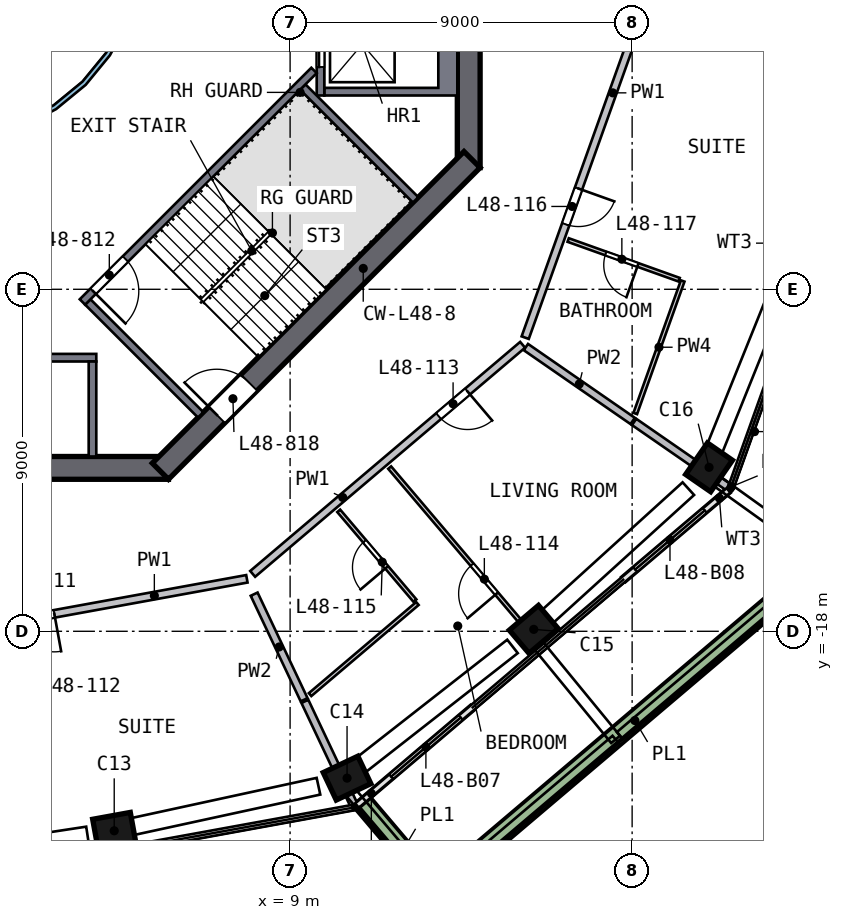
"""IFC4 building model, lengths in metres.
Left out: names, types, materials, properties, quantities, classifications, styles, units other than length and angle.
Written with IfcOpenShell. Run it as: python <this file> out.ifc"""

import sys

from ifc_helpers import new_model, si_unit, direction, frame, frame_2d, origin, origin_2d, place, context, subcontext, project, spatial, polyline, rectangle, outline, extrude, element, fill, save


model = new_model("IFC4")
c1 = context("Model", 3, precision=1e-05, world=origin(), true_north=direction((0.0, 1.0)))
c2 = subcontext(c1, "Body", "Model", "MODEL_VIEW")
j1 = project(units=[si_unit("LENGTHUNIT", "METRE"), si_unit("PLANEANGLEUNIT", "RADIAN")], contexts=[c1])
p1 = place(None, origin())
s1 = spatial("IfcSite", under=j1, at=p1, CompositionType="ELEMENT")
p2 = place(p1, origin())
s2 = spatial("IfcBuilding", under=s1, at=p2, CompositionType="ELEMENT")
p3 = place(p2, frame((0.0, 0.0, 197.5)))
s3 = spatial("IfcBuildingStorey", under=s2, at=p3, CompositionType="ELEMENT", Elevation=197.5)
p4 = place(p3, frame((4.238, -23.276, 0.0), z_axis=(0.110573955, 0.021065327, 0.993644631), x_axis=(0.977632783, 0.177664557, -0.112558637)))
e1 = element("IfcColumn", 1, at=p4, inside=s3, PredefinedType="COLUMN", context=c2, shape_type="SweptSolid", body=[
    extrude(rectangle(XDim=1.0, YDim=0.8, at=origin_2d()), origin(), (0.0, 0.0, 1.0), 3.21),
])
p5 = place(p3, frame((10.373, -21.925, 0.0), z_axis=(0.103848084, 0.050251525, 0.993322888), x_axis=(-0.897782086, -0.425063091, 0.115363312)))
e2 = element("IfcColumn", 2, at=p5, inside=s3, PredefinedType="COLUMN", context=c2, shape_type="SweptSolid", body=[
    extrude(rectangle(XDim=1.0, YDim=0.8, at=origin_2d()), origin(), (0.0, 0.0, 1.0), 3.211),
])
p6 = place(p3, frame((15.308, -18.038, 0.0), z_axis=(0.085174219, 0.073538813, 0.993648527), x_axis=(0.757590083, 0.642958445, -0.112524239)))
e3 = element("IfcColumn", 3, at=p6, inside=s3, PredefinedType="COLUMN", context=c2, shape_type="SweptSolid", body=[
    extrude(rectangle(XDim=1.0, YDim=0.8, at=origin_2d()), origin(), (0.0, 0.0, 1.0), 3.21),
])
p7 = place(p3, frame((19.946, -13.801, 0.0), z_axis=(0.064772376, 0.095410014, 0.99332848), x_axis=(-0.56488901, -0.817069655, 0.115315158)))
e4 = element("IfcColumn", 4, at=p7, inside=s3, PredefinedType="COLUMN", context=c2, shape_type="SweptSolid", body=[
    extrude(rectangle(XDim=1.0, YDim=0.8, at=origin_2d()), origin(), (0.0, 0.0, 1.0), 3.211),
])
p8 = place(p3, frame((13.7, -5.799, 0.0), z_axis=(0.0, 0.0, 1.0), x_axis=(0.0, 1.0, 0.0)))
e5 = element("IfcWall", 5, at=p8, inside=s3, PredefinedType="SHEAR", context=c2, shape_type="SweptSolid", body=[
    extrude(rectangle(XDim=11.598, YDim=0.6, at=frame_2d((5.799, 0.0))), origin(), (0.0, 0.0, 1.0), 3.5),
])
p9 = place(p8, frame((4.899, 0.0, 0.0)))
e6 = element("IfcOpeningElement", 6, at=p9, cuts=e5, PredefinedType="OPENING", context=c2, shape_type="SweptSolid", body=[
    extrude(rectangle(XDim=1.8, YDim=2.1, at=frame_2d((0.9, 1.05))), frame((0.0, 0.31, 0.0), z_axis=(0.0, -1.0, 0.0), x_axis=(1.0, 0.0, 0.0)), (0.0, 0.0, 1.0), 0.62),
])
p10 = place(p3, frame((-5.799, -13.7, 0.0), z_axis=(0.0, 0.0, 1.0), x_axis=(1.0, 0.0, 0.0)))
e7 = element("IfcWall", 7, at=p10, inside=s3, PredefinedType="SHEAR", context=c2, shape_type="SweptSolid", body=[
    extrude(rectangle(XDim=11.598, YDim=0.6, at=frame_2d((5.799, 0.0))), origin(), (0.0, 0.0, 1.0), 3.5),
])
p11 = place(p3, frame((5.587, -13.788, 0.0), z_axis=(0.0, 0.0, 1.0), x_axis=(0.707106781, 0.707106781, 0.0)))
e8 = element("IfcWall", 8, at=p11, inside=s3, PredefinedType="SHEAR", context=c2, shape_type="SweptSolid", body=[
    extrude(rectangle(XDim=11.598, YDim=0.6, at=frame_2d((5.799, 0.0))), origin(), (0.0, 0.0, 1.0), 3.5),
])
p12 = place(p11, frame((2.099, 0.0, 0.0)))
e9 = element("IfcOpeningElement", 9, at=p12, cuts=e8, PredefinedType="OPENING", context=c2, shape_type="SweptSolid", body=[
    extrude(rectangle(XDim=1.2, YDim=2.1, at=frame_2d((0.6, 1.05))), frame((0.0, 0.31, 0.0), z_axis=(0.0, -1.0, 0.0), x_axis=(1.0, 0.0, 0.0)), (0.0, 0.0, 1.0), 0.62),
])
p13 = place(p3, frame((10.769, -22.579, 0.0), z_axis=(0.0, 0.0, 1.0), x_axis=(0.762444731, 0.647053346, 0.0)))
e10 = element("IfcWall", 10, at=p13, inside=s3, PredefinedType="SOLIDWALL", context=c2, shape_type="SweptSolid", body=[
    extrude(rectangle(XDim=3.967, YDim=0.15, at=frame_2d((1.983, 0.0))), origin(), (0.0, 0.0, 1.0), 2.475),
])
p14 = place(p13, frame((1.167, 0.0, 0.0)))
e11 = element("IfcOpeningElement", 11, at=p14, cuts=e10, PredefinedType="OPENING", context=c2, shape_type="SweptSolid", body=[
    extrude(rectangle(XDim=2.4, YDim=2.4, at=frame_2d((1.2, 1.2))), frame((0.0, 0.085, 0.0), z_axis=(0.0, -1.0, 0.0), x_axis=(1.0, 0.0, 0.0)), (0.0, 0.0, 1.0), 0.17),
])
p15 = place(p3, frame((17.776, -16.632, 0.0), z_axis=(0.0, 0.0, 1.0), x_axis=(0.762428215, 0.647072806, 0.0)))
e12 = element("IfcWall", 12, at=p15, inside=s3, PredefinedType="SOLIDWALL", context=c2, shape_type="SweptSolid", body=[
    extrude(rectangle(XDim=3.608, YDim=0.15, at=frame_2d((1.804, 0.0))), origin(), (0.0, 0.0, 1.0), 2.475),
])
p16 = place(p15, frame((0.4, 0.0, 0.0)))
e13 = element("IfcOpeningElement", 13, at=p16, cuts=e12, PredefinedType="OPENING", context=c2, shape_type="SweptSolid", body=[
    extrude(rectangle(XDim=2.4, YDim=2.4, at=frame_2d((1.2, 1.2))), frame((0.0, 0.085, 0.0), z_axis=(0.0, -1.0, 0.0), x_axis=(1.0, 0.0, 0.0)), (0.0, 0.0, 1.0), 0.17),
])
p17 = place(p3, frame((10.932, -22.541, 0.0), z_axis=(0.0, 0.0, 1.0), x_axis=(0.647050058, -0.762447521, 0.0)))
e14 = element("IfcWall", 14, at=p17, inside=s3, PredefinedType="SOLIDWALL", context=c2, shape_type="SweptSolid", body=[
    extrude(rectangle(XDim=3.199, YDim=0.5, at=frame_2d((1.6, 0.0))), origin(), (0.0, 0.0, 1.0), 0.7),
])
p18 = place(p3, frame((13.031, -24.627, 0.0), z_axis=(0.0, 0.0, 1.0), x_axis=(0.762436541, 0.647062996, 0.0)))
e15 = element("IfcWall", 15, at=p18, inside=s3, PredefinedType="SOLIDWALL", context=c2, shape_type="SweptSolid", body=[
    extrude(rectangle(XDim=13.223, YDim=0.5, at=frame_2d((6.612, 0.0))), origin(), (0.0, 0.0, 1.0), 0.7),
])
p19 = place(p3, origin())
e16 = element("IfcWall", 16, at=p19, inside=s3, PredefinedType="SOLIDWALL", context=c2, shape_type="SweptSolid", body=[
    extrude(outline(polyline([(13.4, -3.9), (9.9, -3.9), (9.9, -3.7), (12.9, -3.7), (12.9, -1.4), (9.9, -1.4), (9.9, -1.2), (13.4, -1.2), (13.4, -3.9)])), origin(), (0.0, 0.0, 1.0), 3.19),
])
p20 = place(p3, frame((9.8, -1.2, 0.0), z_axis=(0.0, 0.0, 1.0), x_axis=(0.0, -1.0, 0.0)))
e17 = element("IfcWall", 17, at=p20, inside=s3, PredefinedType="SOLIDWALL", context=c2, shape_type="SweptSolid", body=[
    extrude(rectangle(XDim=2.7, YDim=0.2, at=frame_2d((1.35, 0.0))), origin(), (0.0, 0.0, 1.0), 3.19),
])
p21 = place(p20, frame((0.75, 0.0, 0.0)))
e18 = element("IfcOpeningElement", 18, at=p21, cuts=e17, PredefinedType="OPENING", context=c2, shape_type="SweptSolid", body=[
    extrude(rectangle(XDim=1.2, YDim=2.1, at=frame_2d((0.6, 1.05))), frame((0.0, 0.11, 0.0), z_axis=(0.0, -1.0, 0.0), x_axis=(1.0, 0.0, 0.0)), (0.0, 0.0, 1.0), 0.22),
])
p22 = place(p3, frame((-3.9, -10.8, 0.0), z_axis=(0.0, 0.0, 1.0), x_axis=(1.0, 0.0, 0.0)))
e19 = element("IfcWall", 19, at=p22, inside=s3, PredefinedType="SOLIDWALL", context=c2, shape_type="SweptSolid", body=[
    extrude(rectangle(XDim=7.8, YDim=0.2, at=frame_2d((3.9, 0.0))), origin(), (0.0, 0.0, 1.0), 3.19),
])
p23 = place(p22, frame((3.45, 0.0, 0.0)))
e20 = element("IfcOpeningElement", 20, at=p23, cuts=e19, PredefinedType="OPENING", context=c2, shape_type="SweptSolid", body=[
    extrude(rectangle(XDim=0.9, YDim=2.1, at=frame_2d((0.45, 1.05))), frame((0.0, 0.11, 0.0), z_axis=(0.0, -1.0, 0.0), x_axis=(1.0, 0.0, 0.0)), (0.0, 0.0, 1.0), 0.22),
])
p24 = place(p3, frame((3.8, -10.9, 0.0), z_axis=(0.0, 0.0, 1.0), x_axis=(0.0, -1.0, 0.0)))
e21 = element("IfcWall", 21, at=p24, inside=s3, PredefinedType="SOLIDWALL", context=c2, shape_type="SweptSolid", body=[
    extrude(rectangle(XDim=2.5, YDim=0.2, at=frame_2d((1.25, 0.0))), origin(), (0.0, 0.0, 1.0), 3.19),
])
p25 = place(p3, frame((9.629, -3.24, 0.0), z_axis=(0.0, 0.0, 1.0), x_axis=(-0.707120946, -0.707092617, 0.0)))
e22 = element("IfcWall", 22, at=p25, inside=s3, PredefinedType="SOLIDWALL", context=c2, shape_type="SweptSolid", body=[
    extrude(rectangle(XDim=8.618, YDim=0.2, at=frame_2d((4.309, 0.0))), origin(), (0.0, 0.0, 1.0), 3.19),
])
p26 = place(p25, frame((7.018, 0.0, 0.0)))
e23 = element("IfcOpeningElement", 23, at=p26, cuts=e22, PredefinedType="OPENING", context=c2, shape_type="SweptSolid", body=[
    extrude(rectangle(XDim=1.2, YDim=2.1, at=frame_2d((0.6, 1.05))), frame((0.0, 0.11, 0.0), z_axis=(0.0, -1.0, 0.0), x_axis=(1.0, 0.0, 0.0)), (0.0, 0.0, 1.0), 0.22),
])
for number, where, z_axis, x_axis in (
    (24, (3.677, -9.334, 0.0), (0.0, 0.0, 1.0), (0.707, -0.707, 0.0)),
    (25, (9.334, -3.677, 0.0), (0.0, 0.0, 1.0), (0.707, -0.707, 0.0)),
):
    element("IfcWall", number, at=place(p3, frame(where, z_axis=z_axis, x_axis=x_axis)), inside=s3, PredefinedType="SOLIDWALL", context=c2, shape_type="SweptSolid", body=[
        extrude(rectangle(XDim=4.2, YDim=0.2, at=frame_2d((2.1, 0.0))), origin(), (0.0, 0.0, 1.0), 3.19),
    ])
p27 = place(p3, origin())
e26 = element("IfcWall", 26, at=p27, inside=s3, PredefinedType="SOLIDWALL", context=c2, shape_type="SweptSolid", body=[
    extrude(outline(polyline([(5.021, -0.999), (4.73, -1.959), (4.257, -2.844), (3.62, -3.62), (2.844, -4.257), (1.959, -4.73), (0.999, -5.021), (0.0, -5.12), (-0.999, -5.021), (-1.959, -4.73), (-2.844, -4.257), (-3.62, -3.62), (-4.257, -2.844), (-4.73, -1.959), (-5.021, -0.999), (-5.12, 0.0), (-5.021, 0.999), (-4.73, 1.959), (-4.257, 2.844), (-3.62, 3.62), (-2.844, 4.257), (-1.959, 4.73), (-0.999, 5.021), (0.0, 5.12), (0.999, 5.021), (1.959, 4.73), (2.844, 4.257), (3.62, 3.62), (4.257, 2.844), (4.73, 1.959), (5.021, 0.999), (5.12, 0.0), (5.021, -0.999)]), holes=[polyline([(4.904, 0.976), (4.619, 1.913), (4.157, 2.778), (3.535, 3.535), (2.778, 4.157), (1.913, 4.619), (0.976, 4.904), (0.0, 5.0), (-0.976, 4.904), (-1.913, 4.619), (-2.778, 4.157), (-3.535, 3.535), (-4.157, 2.778), (-4.619, 1.913), (-4.904, 0.976), (-5.0, 0.0), (-4.904, -0.976), (-4.619, -1.913), (-4.157, -2.778), (-3.535, -3.535), (-2.778, -4.157), (-1.913, -4.619), (-0.976, -4.904), (0.0, -5.0), (0.976, -4.904), (1.913, -4.619), (2.778, -4.157), (3.535, -3.535), (4.157, -2.778), (4.619, -1.913), (4.904, -0.976), (5.0, 0.0), (4.904, 0.976)])]), origin(), (0.0, 0.0, 1.0), 3.19),
])
p28 = place(p3, frame((7.863, -16.619, 0.0), z_axis=(0.0, 0.0, 1.0), x_axis=(-0.983823756, -0.179139099, 0.0)))
e27 = element("IfcWall", 27, at=p28, inside=s3, PredefinedType="SOLIDWALL", context=c2, shape_type="SweptSolid", body=[
    extrude(rectangle(XDim=9.316, YDim=0.2, at=frame_2d((4.658, 0.0))), origin(), (0.0, 0.0, 1.0), 3.19),
])
p29 = place(p28, frame((5.15, 0.0, 0.0)))
e28 = element("IfcOpeningElement", 28, at=p29, cuts=e27, PredefinedType="OPENING", context=c2, shape_type="SweptSolid", body=[
    extrude(rectangle(XDim=1.0, YDim=2.1, at=frame_2d((0.5, 1.05))), frame((0.0, 0.11, 0.0), z_axis=(0.0, -1.0, 0.0), x_axis=(1.0, 0.0, 0.0)), (0.0, 0.0, 1.0), 0.22),
])
p30 = place(p3, frame((15.119, -10.461, 0.0), z_axis=(0.0, 0.0, 1.0), x_axis=(-0.762438227, -0.64706101, 0.0)))
e29 = element("IfcWall", 29, at=p30, inside=s3, PredefinedType="SOLIDWALL", context=c2, shape_type="SweptSolid", body=[
    extrude(rectangle(XDim=9.317, YDim=0.2, at=frame_2d((4.658, 0.0))), origin(), (0.0, 0.0, 1.0), 3.19),
])
p31 = place(p30, frame((1.9, 0.0, 0.0)))
e30 = element("IfcOpeningElement", 30, at=p31, cuts=e29, PredefinedType="OPENING", context=c2, shape_type="SweptSolid", body=[
    extrude(rectangle(XDim=1.0, YDim=2.1, at=frame_2d((0.5, 1.05))), frame((0.0, 0.11, 0.0), z_axis=(0.0, -1.0, 0.0), x_axis=(1.0, 0.0, 0.0)), (0.0, 0.0, 1.0), 0.22),
])
p32 = place(p3, frame((18.323, -1.5, 0.0), z_axis=(0.0, 0.0, 1.0), x_axis=(-0.336758012, -0.941591228, 0.0)))
e31 = element("IfcWall", 31, at=p32, inside=s3, PredefinedType="SOLIDWALL", context=c2, shape_type="SweptSolid", body=[
    extrude(rectangle(XDim=9.317, YDim=0.2, at=frame_2d((4.658, 0.0))), origin(), (0.0, 0.0, 1.0), 3.19),
])
p33 = place(p32, frame((5.15, 0.0, 0.0)))
e32 = element("IfcOpeningElement", 32, at=p33, cuts=e31, PredefinedType="OPENING", context=c2, shape_type="SweptSolid", body=[
    extrude(rectangle(XDim=1.0, YDim=2.1, at=frame_2d((0.5, 1.05))), frame((0.0, 0.11, 0.0), z_axis=(0.0, -1.0, 0.0), x_axis=(1.0, 0.0, 0.0)), (0.0, 0.0, 1.0), 0.22),
])
p34 = place(p3, frame((8.054, -17.023, 0.0), z_axis=(0.0, 0.0, 1.0), x_axis=(0.427669877, -0.903934995, 0.0)))
e33 = element("IfcWall", 33, at=p34, inside=s3, PredefinedType="SOLIDWALL", context=c2, shape_type="SweptSolid", body=[
    extrude(rectangle(XDim=3.075, YDim=0.2, at=frame_2d((1.537, 0.0))), origin(), (0.0, 0.0, 1.0), 3.19),
])
p35 = place(p3, frame((9.389, -19.844, 0.0), z_axis=(0.0, 0.0, 1.0), x_axis=(0.427650675, -0.90394408, 0.0)))
e34 = element("IfcWall", 34, at=p35, inside=s3, PredefinedType="SOLIDWALL", context=c2, shape_type="SweptSolid", body=[
    extrude(rectangle(XDim=3.011, YDim=0.2, at=frame_2d((1.506, 0.0))), origin(), (0.0, 0.0, 1.0), 3.19),
])
p36 = place(p3, frame((15.204, -10.52, 0.0), z_axis=(0.0, 0.0, 1.0), x_axis=(0.8223567, -0.568972282, 0.0)))
e35 = element("IfcWall", 35, at=p36, inside=s3, PredefinedType="SOLIDWALL", context=c2, shape_type="SweptSolid", body=[
    extrude(rectangle(XDim=3.418, YDim=0.2, at=frame_2d((1.709, 0.0))), origin(), (0.0, 0.0, 1.0), 3.19),
])
p37 = place(p3, frame((18.052, -12.491, 0.0), z_axis=(0.0, 0.0, 1.0), x_axis=(0.822373098, -0.568948581, 0.0)))
e36 = element("IfcWall", 36, at=p37, inside=s3, PredefinedType="SOLIDWALL", context=c2, shape_type="SweptSolid", body=[
    extrude(rectangle(XDim=3.011, YDim=0.2, at=frame_2d((1.506, 0.0))), origin(), (0.0, 0.0, 1.0), 3.19),
])
p38 = place(p3, frame((9.526, -19.667, 0.0), z_axis=(0.0, 0.0, 1.0), x_axis=(0.76245297, 0.647043638, 0.0)))
e37 = element("IfcWall", 37, at=p38, inside=s3, PredefinedType="PARTITIONING", context=c2, shape_type="SweptSolid", body=[
    extrude(rectangle(XDim=3.704, YDim=0.1, at=frame_2d((1.852, 0.0))), origin(), (0.0, 0.0, 1.0), 3.19),
])
p39 = place(p3, frame((12.285, -17.194, 0.0), z_axis=(0.0, 0.0, 1.0), x_axis=(-0.647067627, 0.762432611, 0.0)))
e38 = element("IfcWall", 38, at=p39, inside=s3, PredefinedType="PARTITIONING", context=c2, shape_type="SweptSolid", body=[
    extrude(rectangle(XDim=3.1, YDim=0.1, at=frame_2d((1.55, 0.0))), origin(), (0.0, 0.0, 1.0), 3.19),
])
p40 = place(p39, frame((1.15, 0.0, 0.0)))
e39 = element("IfcOpeningElement", 39, at=p40, cuts=e38, PredefinedType="OPENING", context=c2, shape_type="SweptSolid", body=[
    extrude(rectangle(XDim=0.9, YDim=2.1, at=frame_2d((0.45, 1.05))), frame((0.0, 0.06, 0.0), z_axis=(0.0, -1.0, 0.0), x_axis=(1.0, 0.0, 0.0)), (0.0, 0.0, 1.0), 0.12),
])
p41 = place(p3, frame((15.599, -18.381, 0.0), z_axis=(0.0, 0.0, 1.0), x_axis=(-0.64704669, 0.762450379, 0.0)))
e40 = element("IfcWall", 40, at=p41, inside=s3, PredefinedType="PARTITIONING", context=c2, shape_type="SweptSolid", body=[
    extrude(rectangle(XDim=6.15, YDim=0.1, at=frame_2d((3.075, 0.0))), origin(), (0.0, 0.0, 1.0), 3.19),
])
p42 = place(p41, frame((1.8, 0.0, 0.0)))
e41 = element("IfcOpeningElement", 41, at=p42, cuts=e40, PredefinedType="OPENING", context=c2, shape_type="SweptSolid", body=[
    extrude(rectangle(XDim=1.0, YDim=2.1, at=frame_2d((0.5, 1.05))), frame((0.0, 0.06, 0.0), z_axis=(0.0, -1.0, 0.0), x_axis=(1.0, 0.0, 0.0)), (0.0, 0.0, 1.0), 0.12),
])
p43 = place(p3, frame((19.236, -8.747, 0.0), z_axis=(0.0, 0.0, 1.0), x_axis=(-0.941592149, 0.336755439, 0.0)))
e42 = element("IfcWall", 42, at=p43, inside=s3, PredefinedType="PARTITIONING", context=c2, shape_type="SweptSolid", body=[
    extrude(rectangle(XDim=3.1, YDim=0.1, at=frame_2d((1.55, 0.0))), origin(), (0.0, 0.0, 1.0), 3.19),
])
p44 = place(p43, frame((1.15, 0.0, 0.0)))
e43 = element("IfcOpeningElement", 43, at=p44, cuts=e42, PredefinedType="OPENING", context=c2, shape_type="SweptSolid", body=[
    extrude(rectangle(XDim=0.9, YDim=2.1, at=frame_2d((0.45, 1.05))), frame((0.0, 0.06, 0.0), z_axis=(0.0, -1.0, 0.0), x_axis=(1.0, 0.0, 0.0)), (0.0, 0.0, 1.0), 0.12),
])
p45 = place(p3, frame((19.33, -8.781, 0.0), z_axis=(0.0, 0.0, 1.0), x_axis=(-0.336737198, -0.941598672, 0.0)))
e44 = element("IfcWall", 44, at=p45, inside=s3, PredefinedType="PARTITIONING", context=c2, shape_type="SweptSolid", body=[
    extrude(rectangle(XDim=3.704, YDim=0.1, at=frame_2d((1.852, 0.0))), origin(), (0.0, 0.0, 1.0), 3.19),
])
p46 = place(p14, origin())
e45 = element("IfcDoor", 45, at=p46, inside=s3, OperationType="SLIDING_TO_LEFT", PredefinedType="DOOR", context=c2, shape_type="SweptSolid", body=[
    extrude(rectangle(XDim=2.4, YDim=2.4, at=frame_2d((1.2, 1.2))), frame((0.0, 0.025, 0.0), z_axis=(0.0, -1.0, 0.0), x_axis=(1.0, 0.0, 0.0)), (0.0, 0.0, 1.0), 0.05),
])
fill(e11, e45)
p47 = place(p16, origin())
e46 = element("IfcDoor", 46, at=p47, inside=s3, OperationType="SLIDING_TO_RIGHT", PredefinedType="DOOR", context=c2, shape_type="SweptSolid", body=[
    extrude(rectangle(XDim=2.4, YDim=2.4, at=frame_2d((1.2, 1.2))), frame((0.0, 0.025, 0.0), z_axis=(0.0, -1.0, 0.0), x_axis=(1.0, 0.0, 0.0)), (0.0, 0.0, 1.0), 0.05),
])
fill(e13, e46)
p48 = place(p21, origin())
e47 = element("IfcDoor", 47, at=p48, inside=s3, OperationType="DOUBLE_DOOR_SLIDING", PredefinedType="DOOR", context=c2, shape_type="SweptSolid", body=[
    extrude(rectangle(XDim=1.2, YDim=2.1, at=frame_2d((0.6, 1.05))), frame((0.0, 0.025, 0.0), z_axis=(0.0, -1.0, 0.0), x_axis=(1.0, 0.0, 0.0)), (0.0, 0.0, 1.0), 0.05),
])
fill(e18, e47)
p49 = place(p26, origin())
e48 = element("IfcDoor", 48, at=p49, inside=s3, OperationType="SINGLE_SWING_RIGHT", PredefinedType="DOOR", context=c2, shape_type="SweptSolid", body=[
    extrude(rectangle(XDim=1.2, YDim=2.1, at=frame_2d((0.6, 1.05))), frame((0.0, 0.025, 0.0), z_axis=(0.0, -1.0, 0.0), x_axis=(1.0, 0.0, 0.0)), (0.0, 0.0, 1.0), 0.05),
])
fill(e23, e48)
p50 = place(p12, origin())
e49 = element("IfcDoor", 49, at=p50, inside=s3, OperationType="SINGLE_SWING_LEFT", PredefinedType="DOOR", context=c2, shape_type="SweptSolid", body=[
    extrude(rectangle(XDim=1.2, YDim=2.1, at=frame_2d((0.6, 1.05))), frame((0.0, 0.025, 0.0), z_axis=(0.0, -1.0, 0.0), x_axis=(1.0, 0.0, 0.0)), (0.0, 0.0, 1.0), 0.05),
])
fill(e9, e49)
p51 = place(p29, origin())
e50 = element("IfcDoor", 50, at=p51, inside=s3, OperationType="SINGLE_SWING_LEFT", PredefinedType="DOOR", context=c2, shape_type="SweptSolid", body=[
    extrude(rectangle(XDim=1.0, YDim=2.1, at=frame_2d((0.5, 1.05))), frame((0.0, 0.025, 0.0), z_axis=(0.0, -1.0, 0.0), x_axis=(1.0, 0.0, 0.0)), (0.0, 0.0, 1.0), 0.05),
])
fill(e28, e50)
p52 = place(p31, origin())
e51 = element("IfcDoor", 51, at=p52, inside=s3, OperationType="SINGLE_SWING_LEFT", PredefinedType="DOOR", context=c2, shape_type="SweptSolid", body=[
    extrude(rectangle(XDim=1.0, YDim=2.1, at=frame_2d((0.5, 1.05))), frame((0.0, 0.025, 0.0), z_axis=(0.0, -1.0, 0.0), x_axis=(1.0, 0.0, 0.0)), (0.0, 0.0, 1.0), 0.05),
])
fill(e30, e51)
p53 = place(p42, origin())
e52 = element("IfcDoor", 52, at=p53, inside=s3, OperationType="SINGLE_SWING_LEFT", PredefinedType="DOOR", context=c2, shape_type="SweptSolid", body=[
    extrude(rectangle(XDim=1.0, YDim=2.1, at=frame_2d((0.5, 1.05))), frame((0.0, 0.025, 0.0), z_axis=(0.0, -1.0, 0.0), x_axis=(1.0, 0.0, 0.0)), (0.0, 0.0, 1.0), 0.05),
])
fill(e41, e52)
p54 = place(p40, origin())
e53 = element("IfcDoor", 53, at=p54, inside=s3, OperationType="SINGLE_SWING_LEFT", PredefinedType="DOOR", context=c2, shape_type="SweptSolid", body=[
    extrude(rectangle(XDim=0.9, YDim=2.1, at=frame_2d((0.45, 1.05))), frame((0.0, 0.025, 0.0), z_axis=(0.0, -1.0, 0.0), x_axis=(1.0, 0.0, 0.0)), (0.0, 0.0, 1.0), 0.05),
])
fill(e39, e53)
p55 = place(p33, origin())
e54 = element("IfcDoor", 54, at=p55, inside=s3, OperationType="SINGLE_SWING_LEFT", PredefinedType="DOOR", context=c2, shape_type="SweptSolid", body=[
    extrude(rectangle(XDim=1.0, YDim=2.1, at=frame_2d((0.5, 1.05))), frame((0.0, 0.025, 0.0), z_axis=(0.0, -1.0, 0.0), x_axis=(1.0, 0.0, 0.0)), (0.0, 0.0, 1.0), 0.05),
])
fill(e32, e54)
p56 = place(p44, origin())
e55 = element("IfcDoor", 55, at=p56, inside=s3, OperationType="SINGLE_SWING_LEFT", PredefinedType="DOOR", context=c2, shape_type="SweptSolid", body=[
    extrude(rectangle(XDim=0.9, YDim=2.1, at=frame_2d((0.45, 1.05))), frame((0.0, 0.025, 0.0), z_axis=(0.0, -1.0, 0.0), x_axis=(1.0, 0.0, 0.0)), (0.0, 0.0, 1.0), 0.05),
])
fill(e43, e55)
save(model, sys.argv[1])
